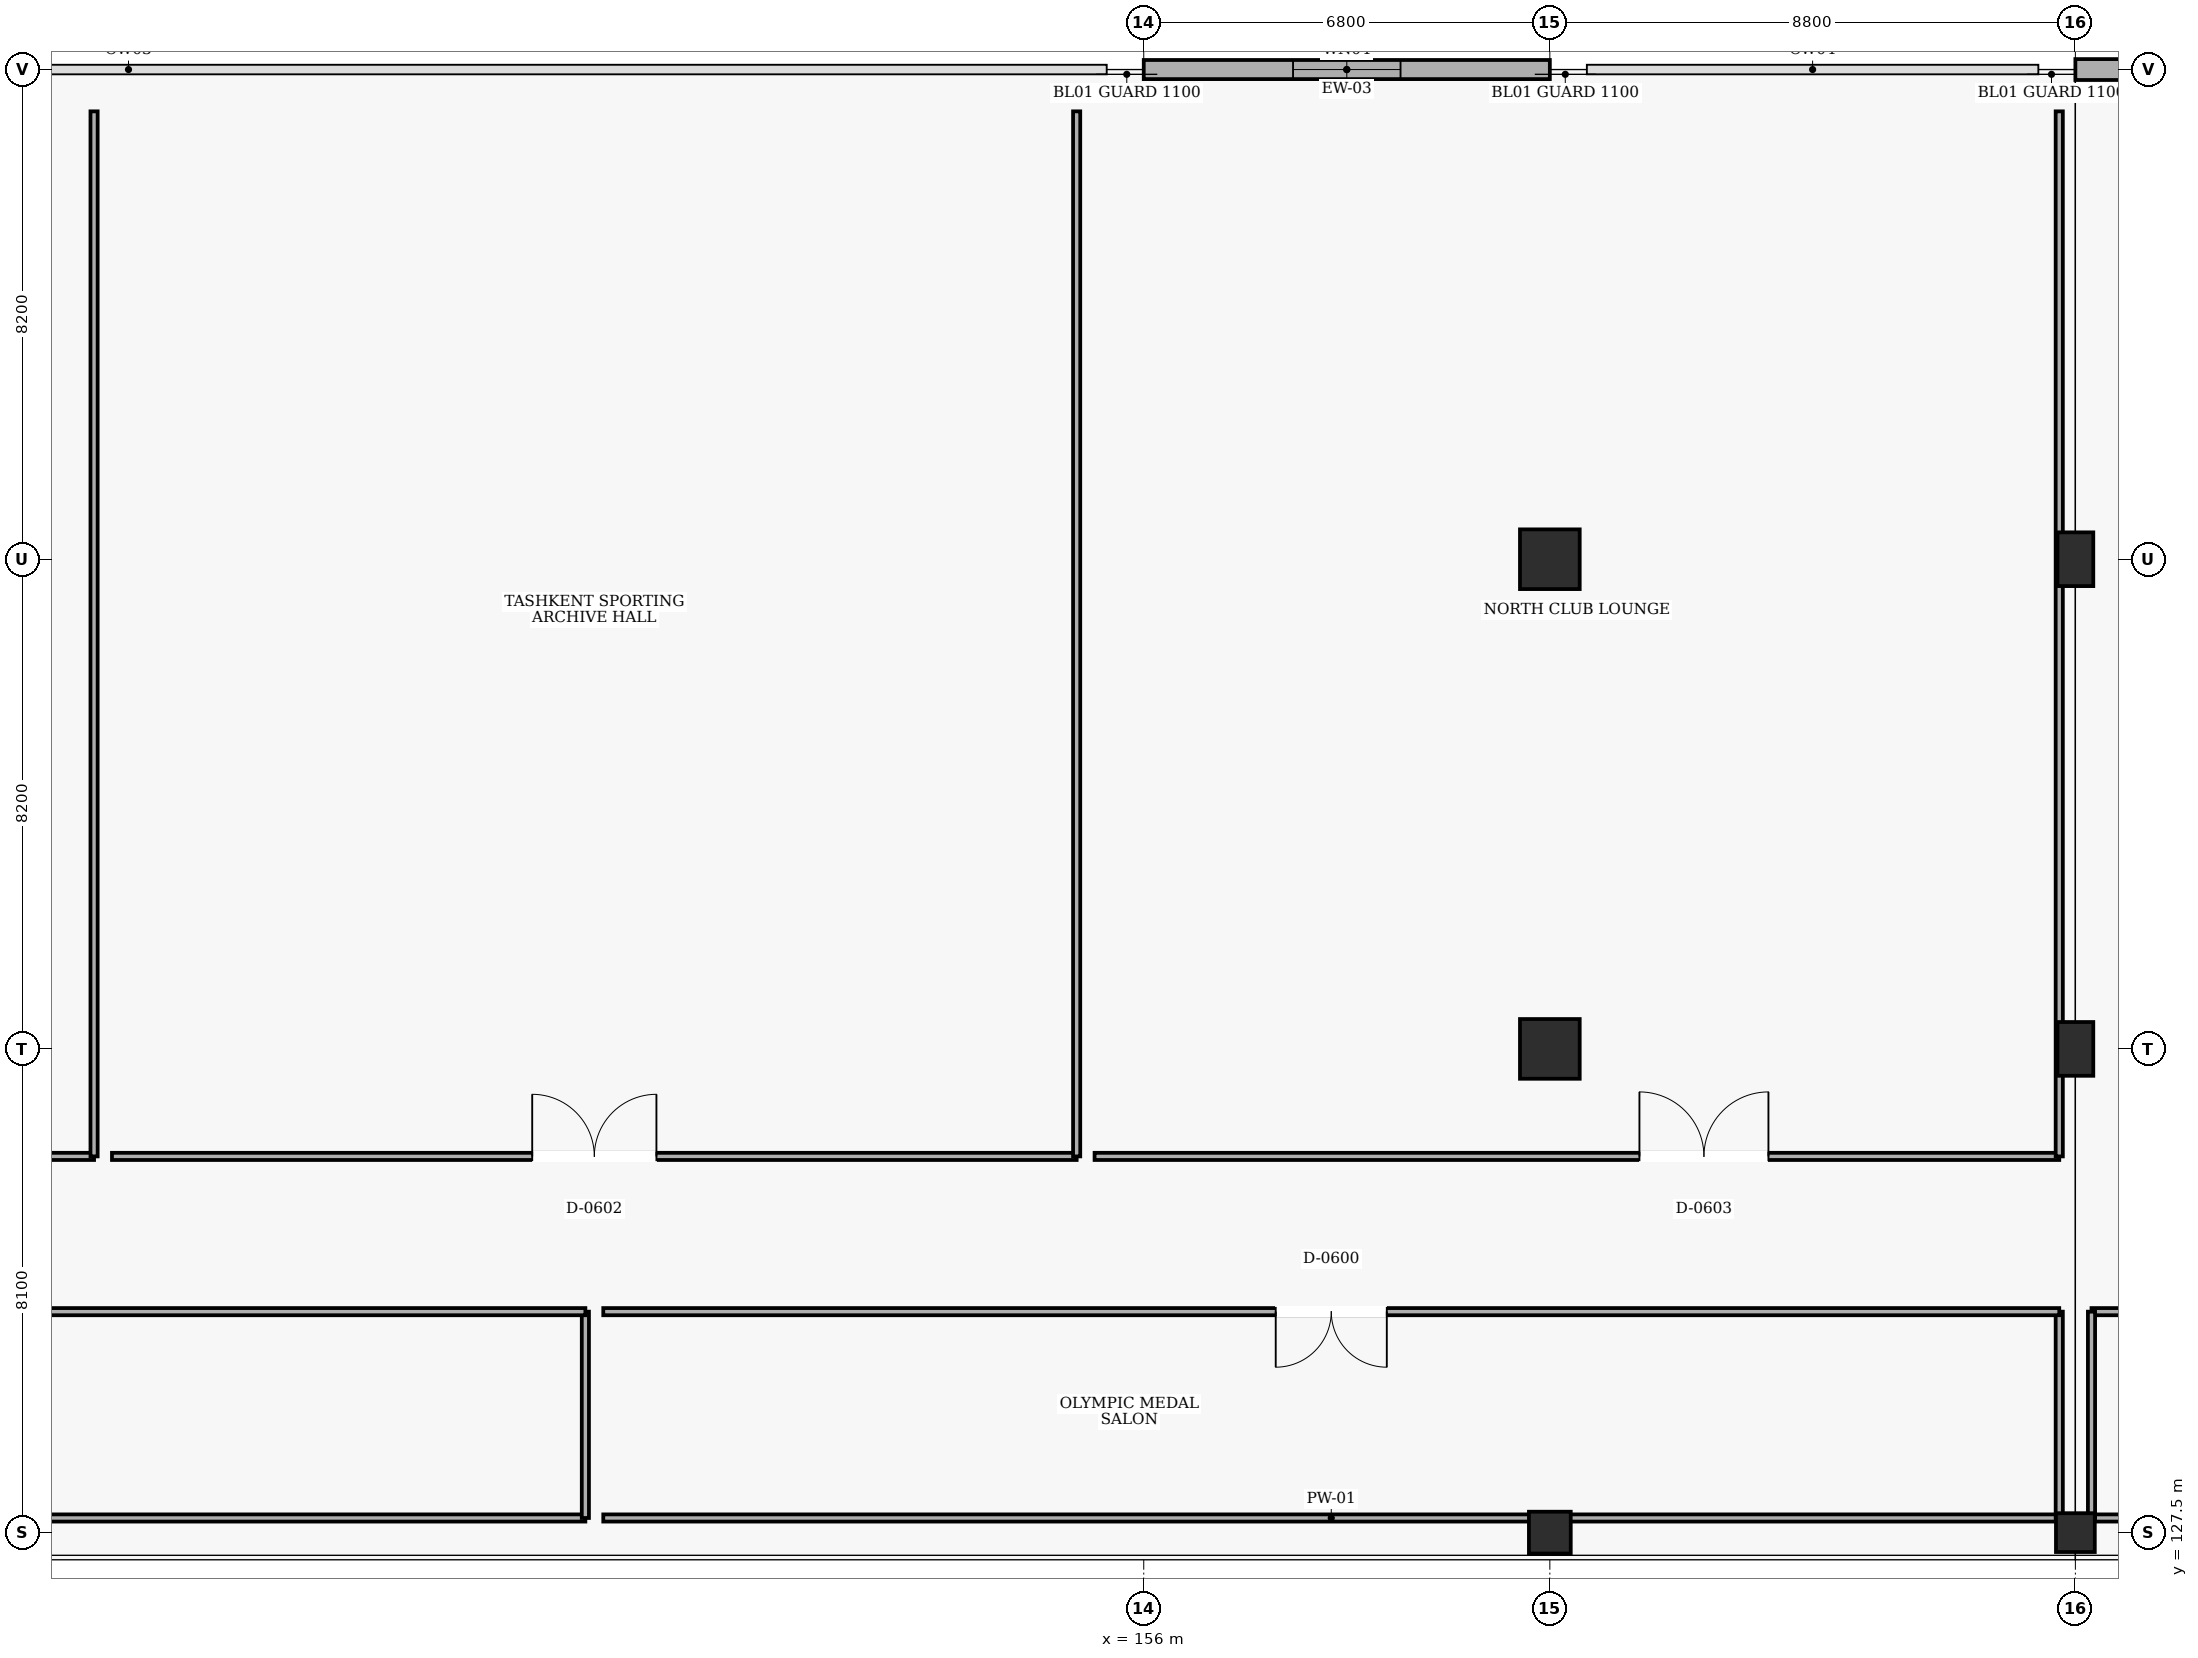
"""IFC4 building model, lengths in metres.
Left out: names, types, materials, properties, quantities, classifications, styles, units other than length and angle.
Written with IfcOpenShell. Run it as: python <this file> out.ifc"""

import sys

from ifc_helpers import new_model, si_unit, direction, frame, frame_2d, origin, origin_2d, place, context, subcontext, project, spatial, rectangle, extrude, element, fill, save


model = new_model("IFC4")
c1 = context("Model", 3, precision=1e-05, world=origin(), true_north=direction((0.0, 1.0)))
c2 = subcontext(c1, "Body", "Model", "MODEL_VIEW")
j1 = project(units=[si_unit("LENGTHUNIT", "METRE"), si_unit("PLANEANGLEUNIT", "RADIAN")], contexts=[c1])
p1 = place(None, origin())
s1 = spatial("IfcSite", under=j1, at=p1, CompositionType="ELEMENT")
p2 = place(p1, origin())
s2 = spatial("IfcBuilding", under=s1, at=p2, CompositionType="ELEMENT")
p3 = place(p2, frame((0.0, 0.0, 10.2)))
s3 = spatial("IfcBuildingStorey", under=s2, at=p3, CompositionType="ELEMENT", Elevation=10.2)
p4 = place(p3, frame((162.8, 127.5, 0.0), z_axis=(0.0, 0.0, 1.0), x_axis=(1.0, 0.0, 0.0)))
e1 = element("IfcColumn", 1, at=p4, inside=s3, PredefinedType="COLUMN", context=c2, shape_type="SweptSolid", body=[
    extrude(rectangle(XDim=0.7, YDim=0.7, at=origin_2d()), origin(), (0.0, 0.0, 1.0), 4.8),
])
for number, where, z_axis, x_axis in (
    (2, (162.8, 135.6, 0.0), (0.0, 0.0, 1.0), (1.0, 0.0, 0.0)),
    (3, (162.8, 143.8, 0.0), (0.0, 0.0, 1.0), (1.0, 0.0, 0.0)),
):
    element("IfcColumn", number, at=place(p3, frame(where, z_axis=z_axis, x_axis=x_axis)), inside=s3, PredefinedType="COLUMN", context=c2, shape_type="SweptSolid", body=[
        extrude(rectangle(XDim=1.0, YDim=1.0, at=origin_2d()), origin(), (0.0, 0.0, 1.0), 4.8),
    ])
p5 = place(p3, frame((171.6, 127.5, 0.0), z_axis=(0.0, 0.0, 1.0), x_axis=(1.0, 0.0, 0.0)))
e4 = element("IfcColumn", 4, at=p5, inside=s3, PredefinedType="COLUMN", context=c2, shape_type="SweptSolid", body=[
    extrude(rectangle(XDim=0.65, YDim=0.65, at=origin_2d()), origin(), (0.0, 0.0, 1.0), 4.8),
])
for number, where, z_axis, x_axis in (
    (5, (171.6, 135.6, 0.0), (0.0, 0.0, 1.0), (1.0, 0.0, 0.0)),
    (6, (171.6, 143.8, 0.0), (0.0, 0.0, 1.0), (1.0, 0.0, 0.0)),
):
    element("IfcColumn", number, at=place(p3, frame(where, z_axis=z_axis, x_axis=x_axis)), inside=s3, PredefinedType="COLUMN", context=c2, shape_type="SweptSolid", body=[
        extrude(rectangle(XDim=0.6, YDim=0.9, at=origin_2d()), origin(), (0.0, 0.0, 1.0), 4.8),
    ])
p6 = place(p3, frame((156.0, 152.0, 0.0), z_axis=(0.0, 0.0, 1.0), x_axis=(1.0, 0.0, 0.0)))
e7 = element("IfcWall", 7, at=p6, inside=s3, PredefinedType="SOLIDWALL", context=c2, shape_type="SweptSolid", body=[
    extrude(rectangle(XDim=6.8, YDim=0.32, at=frame_2d((3.4, 0.0))), origin(), (0.0, 0.0, 1.0), 4.48),
])
p7 = place(p6, frame((2.5, 0.0, 0.9)))
e8 = element("IfcOpeningElement", 8, at=p7, cuts=e7, PredefinedType="OPENING", context=c2, shape_type="SweptSolid", body=[
    extrude(rectangle(XDim=1.8, YDim=1.5, at=frame_2d((0.9, 0.75))), frame((0.0, 0.17, 0.0), z_axis=(0.0, -1.0, 0.0), x_axis=(1.0, 0.0, 0.0)), (0.0, 0.0, 1.0), 0.34),
])
p8 = place(p3, frame((171.6, 152.0, 0.0), z_axis=(0.0, 0.0, 1.0), x_axis=(1.0, 0.0, 0.0)))
e9 = element("IfcWall", 9, at=p8, inside=s3, PredefinedType="SOLIDWALL", context=c2, shape_type="SweptSolid", body=[
    extrude(rectangle(XDim=8.8, YDim=0.35, at=frame_2d((4.4, 0.0))), origin(), (0.0, 0.0, 1.0), 4.48),
])
p9 = place(p8, frame((3.4, 0.0, 0.9)))
e10 = element("IfcOpeningElement", 10, at=p9, cuts=e9, PredefinedType="OPENING", context=c2, shape_type="SweptSolid", body=[
    extrude(rectangle(XDim=2.0, YDim=1.5, at=frame_2d((1.0, 0.75))), frame((0.0, 0.185, 0.0), z_axis=(0.0, -1.0, 0.0), x_axis=(1.0, 0.0, 0.0)), (0.0, 0.0, 1.0), 0.37),
])
p10 = place(p3, frame((122.27, 127.745, 0.0), z_axis=(0.0, 0.0, 1.0), x_axis=(1.0, 0.0, 0.0)))
e11 = element("IfcWall", 11, at=p10, inside=s3, PredefinedType="PARTITIONING", context=c2, shape_type="SweptSolid", body=[
    extrude(rectangle(XDim=24.38, YDim=0.12, at=frame_2d((12.19, 0.0))), origin(), (0.0, 0.0, 1.0), 4.48),
])
p11 = place(p3, frame((146.65, 127.745, 0.0), z_axis=(0.0, 0.0, 1.0), x_axis=(0.0, 1.0, 0.0)))
e12 = element("IfcWall", 12, at=p11, inside=s3, PredefinedType="PARTITIONING", context=c2, shape_type="SweptSolid", body=[
    extrude(rectangle(XDim=3.455, YDim=0.12, at=frame_2d((1.728, 0.0))), origin(), (0.0, 0.0, 1.0), 4.48),
])
p12 = place(p3, frame((146.65, 131.2, 0.0), z_axis=(0.0, 0.0, 1.0), x_axis=(-1.0, 0.0, 0.0)))
e13 = element("IfcWall", 13, at=p12, inside=s3, PredefinedType="PARTITIONING", context=c2, shape_type="SweptSolid", body=[
    extrude(rectangle(XDim=24.38, YDim=0.12, at=frame_2d((12.19, 0.0))), origin(), (0.0, 0.0, 1.0), 4.48),
])
p13 = place(p12, frame((11.31, 0.0, 0.0)))
e14 = element("IfcOpeningElement", 14, at=p13, cuts=e13, PredefinedType="OPENING", context=c2, shape_type="SweptSolid", body=[
    extrude(rectangle(XDim=1.76, YDim=2.25, at=frame_2d((0.88, 1.125))), frame((0.0, 0.07, 0.0), z_axis=(0.0, -1.0, 0.0), x_axis=(1.0, 0.0, 0.0)), (0.0, 0.0, 1.0), 0.14),
])
p14 = place(p3, frame((146.95, 127.745, 0.0), z_axis=(0.0, 0.0, 1.0), x_axis=(1.0, 0.0, 0.0)))
e15 = element("IfcWall", 15, at=p14, inside=s3, PredefinedType="PARTITIONING", context=c2, shape_type="SweptSolid", body=[
    extrude(rectangle(XDim=24.38, YDim=0.12, at=frame_2d((12.19, 0.0))), origin(), (0.0, 0.0, 1.0), 3.86),
])
p15 = place(p3, frame((171.33, 127.745, 0.0), z_axis=(0.0, 0.0, 1.0), x_axis=(0.0, 1.0, 0.0)))
e16 = element("IfcWall", 16, at=p15, inside=s3, PredefinedType="PARTITIONING", context=c2, shape_type="SweptSolid", body=[
    extrude(rectangle(XDim=3.455, YDim=0.12, at=frame_2d((1.728, 0.0))), origin(), (0.0, 0.0, 1.0), 3.76),
])
p16 = place(p3, frame((171.33, 131.2, 0.0), z_axis=(0.0, 0.0, 1.0), x_axis=(-1.0, 0.0, 0.0)))
e17 = element("IfcWall", 17, at=p16, inside=s3, PredefinedType="PARTITIONING", context=c2, shape_type="SweptSolid", body=[
    extrude(rectangle(XDim=24.38, YDim=0.12, at=frame_2d((12.19, 0.0))), origin(), (0.0, 0.0, 1.0), 4.48),
])
p17 = place(p16, frame((11.26, 0.0, 0.0)))
e18 = element("IfcOpeningElement", 18, at=p17, cuts=e17, PredefinedType="OPENING", context=c2, shape_type="SweptSolid", body=[
    extrude(rectangle(XDim=1.86, YDim=2.3, at=frame_2d((0.93, 1.15))), frame((0.0, 0.07, 0.0), z_axis=(0.0, -1.0, 0.0), x_axis=(1.0, 0.0, 0.0)), (0.0, 0.0, 1.0), 0.14),
])
p18 = place(p3, frame((122.27, 133.8, 0.0), z_axis=(0.0, 0.0, 1.0), x_axis=(1.0, 0.0, 0.0)))
e19 = element("IfcWall", 19, at=p18, inside=s3, PredefinedType="PARTITIONING", context=c2, shape_type="SweptSolid", body=[
    extrude(rectangle(XDim=16.153, YDim=0.12, at=frame_2d((8.077, 0.0))), origin(), (0.0, 0.0, 1.0), 4.48),
])
p19 = place(p18, frame((7.097, 0.0, 0.0)))
e20 = element("IfcOpeningElement", 20, at=p19, cuts=e19, PredefinedType="OPENING", context=c2, shape_type="SweptSolid", body=[
    extrude(rectangle(XDim=1.96, YDim=2.3, at=frame_2d((0.98, 1.15))), frame((0.0, 0.07, 0.0), z_axis=(0.0, -1.0, 0.0), x_axis=(1.0, 0.0, 0.0)), (0.0, 0.0, 1.0), 0.14),
])
p20 = place(p3, frame((138.423, 133.8, 0.0), z_axis=(0.0, 0.0, 1.0), x_axis=(0.0, 1.0, 0.0)))
e21 = element("IfcWall", 21, at=p20, inside=s3, PredefinedType="PARTITIONING", context=c2, shape_type="SweptSolid", body=[
    extrude(rectangle(XDim=17.5, YDim=0.12, at=frame_2d((8.75, 0.0))), origin(), (0.0, 0.0, 1.0), 4.48),
])
p21 = place(p3, frame((138.723, 133.8, 0.0), z_axis=(0.0, 0.0, 1.0), x_axis=(1.0, 0.0, 0.0)))
e22 = element("IfcWall", 22, at=p21, inside=s3, PredefinedType="PARTITIONING", context=c2, shape_type="SweptSolid", body=[
    extrude(rectangle(XDim=16.153, YDim=0.12, at=frame_2d((8.077, 0.0))), origin(), (0.0, 0.0, 1.0), 4.48),
])
p22 = place(p21, frame((7.037, 0.0, 0.0)))
e23 = element("IfcOpeningElement", 23, at=p22, cuts=e22, PredefinedType="OPENING", context=c2, shape_type="SweptSolid", body=[
    extrude(rectangle(XDim=2.08, YDim=2.35, at=frame_2d((1.04, 1.175))), frame((0.0, 0.07, 0.0), z_axis=(0.0, -1.0, 0.0), x_axis=(1.0, 0.0, 0.0)), (0.0, 0.0, 1.0), 0.14),
])
p23 = place(p3, frame((154.877, 133.8, 0.0), z_axis=(0.0, 0.0, 1.0), x_axis=(0.0, 1.0, 0.0)))
e24 = element("IfcWall", 24, at=p23, inside=s3, PredefinedType="PARTITIONING", context=c2, shape_type="SweptSolid", body=[
    extrude(rectangle(XDim=17.5, YDim=0.12, at=frame_2d((8.75, 0.0))), origin(), (0.0, 0.0, 1.0), 4.48),
])
p24 = place(p3, frame((155.177, 133.8, 0.0), z_axis=(0.0, 0.0, 1.0), x_axis=(1.0, 0.0, 0.0)))
e25 = element("IfcWall", 25, at=p24, inside=s3, PredefinedType="PARTITIONING", context=c2, shape_type="SweptSolid", body=[
    extrude(rectangle(XDim=16.153, YDim=0.12, at=frame_2d((8.077, 0.0))), origin(), (0.0, 0.0, 1.0), 4.48),
])
p25 = place(p24, frame((9.124, 0.0, 0.0)))
e26 = element("IfcOpeningElement", 26, at=p25, cuts=e25, PredefinedType="OPENING", context=c2, shape_type="SweptSolid", body=[
    extrude(rectangle(XDim=2.16, YDim=2.35, at=frame_2d((1.08, 1.175))), frame((0.0, 0.07, 0.0), z_axis=(0.0, -1.0, 0.0), x_axis=(1.0, 0.0, 0.0)), (0.0, 0.0, 1.0), 0.14),
])
p26 = place(p3, frame((171.33, 133.8, 0.0), z_axis=(0.0, 0.0, 1.0), x_axis=(0.0, 1.0, 0.0)))
e27 = element("IfcWall", 27, at=p26, inside=s3, PredefinedType="PARTITIONING", context=c2, shape_type="SweptSolid", body=[
    extrude(rectangle(XDim=17.5, YDim=0.12, at=frame_2d((8.75, 0.0))), origin(), (0.0, 0.0, 1.0), 3.76),
])
p27 = place(p3, frame((171.87, 127.745, 0.0), z_axis=(0.0, 0.0, 1.0), x_axis=(1.0, 0.0, 0.0)))
e28 = element("IfcWall", 28, at=p27, inside=s3, PredefinedType="PARTITIONING", context=c2, shape_type="SweptSolid", body=[
    extrude(rectangle(XDim=15.212, YDim=0.12, at=frame_2d((7.606, 0.0))), origin(), (0.0, 0.0, 1.0), 3.86),
])
p28 = place(p3, frame((187.082, 131.2, 0.0), z_axis=(0.0, 0.0, 1.0), x_axis=(-1.0, 0.0, 0.0)))
e29 = element("IfcWall", 29, at=p28, inside=s3, PredefinedType="PARTITIONING", context=c2, shape_type="SweptSolid", body=[
    extrude(rectangle(XDim=15.212, YDim=0.12, at=frame_2d((7.606, 0.0))), origin(), (0.0, 0.0, 1.0), 4.48),
])
p29 = place(p28, frame((6.466, 0.0, 0.0)))
e30 = element("IfcOpeningElement", 30, at=p29, cuts=e29, PredefinedType="OPENING", context=c2, shape_type="SweptSolid", body=[
    extrude(rectangle(XDim=2.28, YDim=2.4, at=frame_2d((1.14, 1.2))), frame((0.0, 0.07, 0.0), z_axis=(0.0, -1.0, 0.0), x_axis=(1.0, 0.0, 0.0)), (0.0, 0.0, 1.0), 0.14),
])
p30 = place(p3, frame((171.87, 131.2, 0.0), z_axis=(0.0, 0.0, 1.0), x_axis=(0.0, -1.0, 0.0)))
e31 = element("IfcWall", 31, at=p30, inside=s3, PredefinedType="PARTITIONING", context=c2, shape_type="SweptSolid", body=[
    extrude(rectangle(XDim=3.455, YDim=0.12, at=frame_2d((1.728, 0.0))), origin(), (0.0, 0.0, 1.0), 3.76),
])
p31 = place(p7, origin())
e32 = element("IfcWindow", 32, at=p31, inside=s3, PartitioningType="SINGLE_PANEL", PredefinedType="WINDOW", context=c2, shape_type="SweptSolid", body=[
    extrude(rectangle(XDim=1.8, YDim=1.5, at=frame_2d((0.9, 0.75))), frame((0.0, 0.03, 0.0), z_axis=(0.0, -1.0, 0.0), x_axis=(1.0, 0.0, 0.0)), (0.0, 0.0, 1.0), 0.06),
])
fill(e8, e32)
p32 = place(p17, origin())
e33 = element("IfcDoor", 33, at=p32, inside=s3, OperationType="DOUBLE_DOOR_SINGLE_SWING", PredefinedType="DOOR", context=c2, shape_type="SweptSolid", body=[
    extrude(rectangle(XDim=1.86, YDim=2.3, at=frame_2d((0.93, 1.15))), frame((0.0, 0.025, 0.0), z_axis=(0.0, -1.0, 0.0), x_axis=(1.0, 0.0, 0.0)), (0.0, 0.0, 1.0), 0.05),
])
fill(e18, e33)
p33 = place(p22, origin())
e34 = element("IfcDoor", 34, at=p33, inside=s3, OperationType="DOUBLE_DOOR_SINGLE_SWING", PredefinedType="DOOR", context=c2, shape_type="SweptSolid", body=[
    extrude(rectangle(XDim=2.08, YDim=2.35, at=frame_2d((1.04, 1.175))), frame((0.0, 0.025, 0.0), z_axis=(0.0, -1.0, 0.0), x_axis=(1.0, 0.0, 0.0)), (0.0, 0.0, 1.0), 0.05),
])
fill(e23, e34)
p34 = place(p25, origin())
e35 = element("IfcDoor", 35, at=p34, inside=s3, OperationType="DOUBLE_DOOR_SINGLE_SWING", PredefinedType="DOOR", context=c2, shape_type="SweptSolid", body=[
    extrude(rectangle(XDim=2.16, YDim=2.35, at=frame_2d((1.08, 1.175))), frame((0.0, 0.025, 0.0), z_axis=(0.0, -1.0, 0.0), x_axis=(1.0, 0.0, 0.0)), (0.0, 0.0, 1.0), 0.05),
])
fill(e26, e35)
save(model, sys.argv[1])
